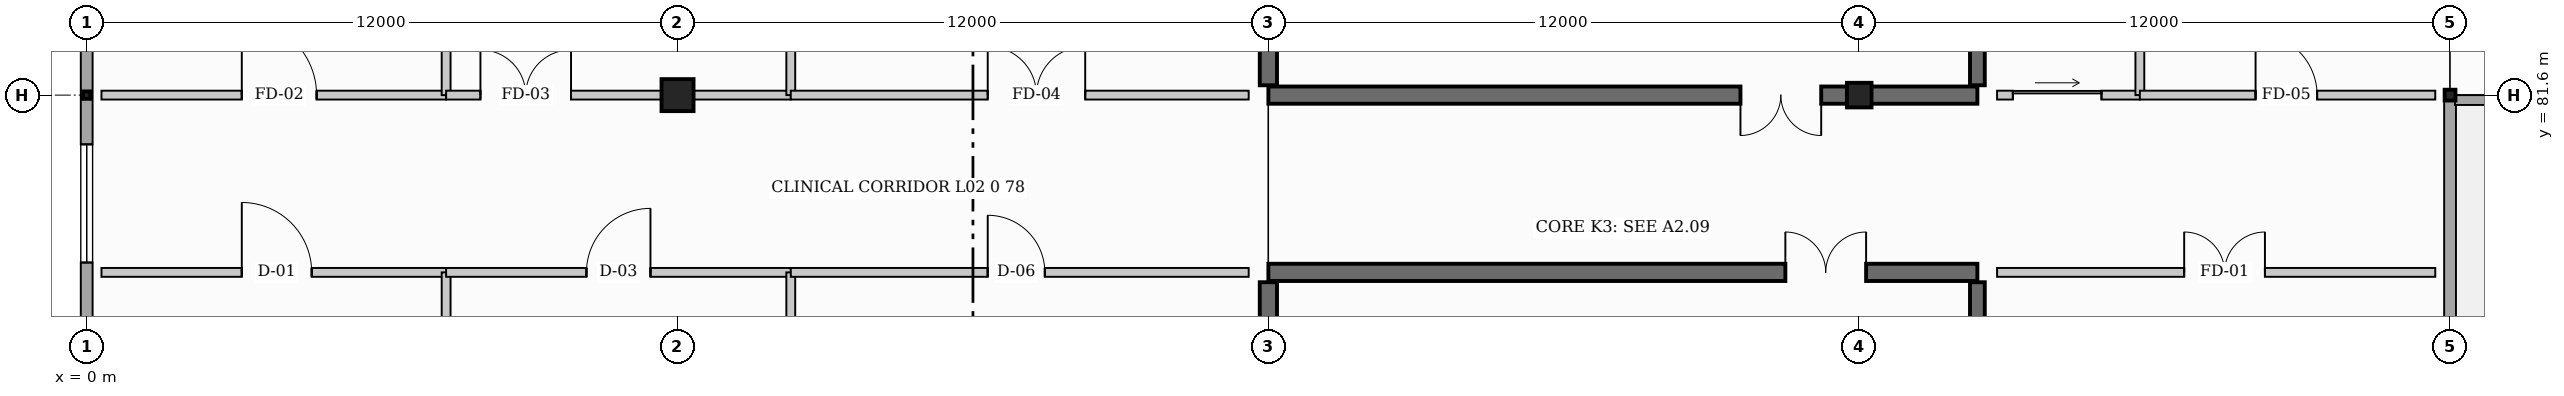
"""IFC4 building model, lengths in metres.
Left out: names, types, materials, properties, quantities, classifications, styles, units other than length and angle.
Written with IfcOpenShell. Run it as: python <this file> out.ifc"""

import sys

from ifc_helpers import new_model, si_unit, direction, frame, frame_2d, origin, origin_2d, place, context, subcontext, project, spatial, rectangle, hollow_rectangle, hollow_circle, i_section, extrude, element, fill, save


model = new_model("IFC4")
c1 = context("Model", 3, precision=1e-05, world=origin(), true_north=direction((0.0, 1.0)))
c2 = subcontext(c1, "Body", "Model", "MODEL_VIEW")
j1 = project(units=[si_unit("LENGTHUNIT", "METRE"), si_unit("PLANEANGLEUNIT", "RADIAN")], contexts=[c1])
p1 = place(None, origin())
s1 = spatial("IfcSite", under=j1, at=p1, CompositionType="ELEMENT")
p2 = place(p1, origin())
s2 = spatial("IfcBuilding", under=s1, at=p2, CompositionType="ELEMENT")
p3 = place(p2, frame((0.0, 0.0, 9.6)))
s3 = spatial("IfcBuildingStorey", under=s2, at=p3, CompositionType="ELEMENT", Elevation=9.6)
p4 = place(p3, frame((0.0, 81.6, 0.0), z_axis=(0.0, 0.0, 1.0), x_axis=(1.0, 0.0, 0.0)))
e1 = element("IfcColumn", 1, at=p4, inside=s3, PredefinedType="COLUMN", context=c2, shape_type="SweptSolid", body=[
    extrude(hollow_rectangle(XDim=0.15, YDim=0.15, WallThickness=0.008, at=origin_2d()), origin(), (0.0, 0.0, 1.0), 4.8),
])
p5 = place(p3, frame((12.0, 81.6, 0.0), z_axis=(0.0, 0.0, 1.0), x_axis=(0.0, 1.0, 0.0)))
e2 = element("IfcColumn", 2, at=p5, inside=s3, PredefinedType="COLUMN", context=c2, shape_type="SweptSolid", body=[
    extrude(rectangle(XDim=0.65, YDim=0.65, at=origin_2d()), origin(), (0.0, 0.0, 1.0), 4.8),
])
p6 = place(p3, frame((36.0, 81.6, 0.0), z_axis=(0.0, 0.0, 1.0), x_axis=(0.0, 1.0, 0.0)))
e3 = element("IfcColumn", 3, at=p6, inside=s3, PredefinedType="COLUMN", context=c2, shape_type="SweptSolid", body=[
    extrude(i_section(OverallWidth=0.5, OverallDepth=0.5, WebThickness=0.022, FlangeThickness=0.036, at=origin_2d()), origin(), (0.0, 0.0, 1.0), 4.8),
])
p7 = place(p3, frame((48.0, 81.6, 0.0), z_axis=(0.0, 0.0, 1.0), x_axis=(1.0, 0.0, 0.0)))
e4 = element("IfcColumn", 4, at=p7, inside=s3, PredefinedType="COLUMN", context=c2, shape_type="SweptSolid", body=[
    extrude(hollow_circle(Radius=0.11, WallThickness=0.01, at=origin_2d()), origin(), (0.0, 0.0, 1.0), 4.8),
])
p8 = place(p3, frame((24.0, 78.0, 0.0), z_axis=(0.0, 0.0, 1.0), x_axis=(1.0, 0.0, 0.0)))
e5 = element("IfcWall", 5, at=p8, inside=s3, PredefinedType="SHEAR", context=c2, shape_type="SweptSolid", body=[
    extrude(rectangle(XDim=14.4, YDim=0.35, at=frame_2d((7.2, 0.0))), origin(), (0.0, 0.0, 1.0), 4.8),
])
p9 = place(p8, frame((10.5, 0.0, 0.0)))
e6 = element("IfcOpeningElement", 6, at=p9, cuts=e5, PredefinedType="OPENING", context=c2, shape_type="SweptSolid", body=[
    extrude(rectangle(XDim=1.64, YDim=2.2, at=frame_2d((0.82, 1.1))), frame((0.0, 0.185, 0.0), z_axis=(0.0, -1.0, 0.0), x_axis=(1.0, 0.0, 0.0)), (0.0, 0.0, 1.0), 0.37),
])
p10 = place(p3, frame((24.0, 69.8, 0.0), z_axis=(0.0, 0.0, 1.0), x_axis=(0.0, 1.0, 0.0)))
e7 = element("IfcWall", 7, at=p10, inside=s3, PredefinedType="SHEAR", context=c2, shape_type="SweptSolid", body=[
    extrude(rectangle(XDim=8.0, YDim=0.35, at=frame_2d((4.0, 0.0))), origin(), (0.0, 0.0, 1.0), 4.8),
])
p11 = place(p3, frame((38.4, 77.8, 0.0), z_axis=(0.0, 0.0, 1.0), x_axis=(0.0, -1.0, 0.0)))
e8 = element("IfcWall", 8, at=p11, inside=s3, PredefinedType="SHEAR", context=c2, shape_type="SweptSolid", body=[
    extrude(rectangle(XDim=8.0, YDim=0.3, at=frame_2d((4.0, 0.0))), origin(), (0.0, 0.0, 1.0), 4.8),
])
p12 = place(p3, frame((38.4, 81.6, 0.0), z_axis=(0.0, 0.0, 1.0), x_axis=(-1.0, 0.0, 0.0)))
e9 = element("IfcWall", 9, at=p12, inside=s3, PredefinedType="SHEAR", context=c2, shape_type="SweptSolid", body=[
    extrude(rectangle(XDim=14.4, YDim=0.35, at=frame_2d((7.2, 0.0))), origin(), (0.0, 0.0, 1.0), 4.8),
])
p13 = place(p12, frame((3.172, 0.0, 0.0)))
e10 = element("IfcOpeningElement", 10, at=p13, cuts=e9, PredefinedType="OPENING", context=c2, shape_type="SweptSolid", body=[
    extrude(rectangle(XDim=1.64, YDim=2.2, at=frame_2d((0.82, 1.1))), frame((0.0, 0.185, 0.0), z_axis=(0.0, -1.0, 0.0), x_axis=(1.0, 0.0, 0.0)), (0.0, 0.0, 1.0), 0.37),
])
p14 = place(p3, frame((24.0, 81.8, 0.0), z_axis=(0.0, 0.0, 1.0), x_axis=(0.0, 1.0, 0.0)))
e11 = element("IfcWall", 11, at=p14, inside=s3, PredefinedType="SHEAR", context=c2, shape_type="SweptSolid", body=[
    extrude(rectangle(XDim=8.0, YDim=0.35, at=frame_2d((4.0, 0.0))), origin(), (0.0, 0.0, 1.0), 4.8),
])
p15 = place(p3, frame((38.4, 89.8, 0.0), z_axis=(0.0, 0.0, 1.0), x_axis=(0.0, -1.0, 0.0)))
e12 = element("IfcWall", 12, at=p15, inside=s3, PredefinedType="SHEAR", context=c2, shape_type="SweptSolid", body=[
    extrude(rectangle(XDim=8.0, YDim=0.3, at=frame_2d((4.0, 0.0))), origin(), (0.0, 0.0, 1.0), 4.8),
])
p16 = place(p3, frame((0.0, 57.6, 0.0), z_axis=(0.0, 0.0, 1.0), x_axis=(0.0, 1.0, 0.0)))
e13 = element("IfcWall", 13, at=p16, inside=s3, PredefinedType="STANDARD", context=c2, shape_type="SweptSolid", body=[
    extrude(rectangle(XDim=57.6, YDim=0.24, at=frame_2d((28.8, 0.0))), origin(), (0.0, 0.0, 1.0), 3.465),
])
p17 = place(p16, frame((1.1, 0.0, 2.1)))
e14 = element("IfcOpeningElement", 14, at=p17, cuts=e13, PredefinedType="OPENING", context=c2, shape_type="SweptSolid", body=[
    extrude(rectangle(XDim=2.4, YDim=0.9, at=frame_2d((1.2, 0.45))), frame((0.0, 0.13, 0.0), z_axis=(0.0, -1.0, 0.0), x_axis=(1.0, 0.0, 0.0)), (0.0, 0.0, 1.0), 0.26),
])
p18 = place(p16, frame((5.0, 0.0, 2.1)))
e15 = element("IfcOpeningElement", 15, at=p18, cuts=e13, PredefinedType="OPENING", context=c2, shape_type="SweptSolid", body=[
    extrude(rectangle(XDim=2.4, YDim=0.9, at=frame_2d((1.2, 0.45))), frame((0.0, 0.13, 0.0), z_axis=(0.0, -1.0, 0.0), x_axis=(1.0, 0.0, 0.0)), (0.0, 0.0, 1.0), 0.26),
])
p19 = place(p16, frame((16.7, 0.0, 2.1)))
e16 = element("IfcOpeningElement", 16, at=p19, cuts=e13, PredefinedType="OPENING", context=c2, shape_type="SweptSolid", body=[
    extrude(rectangle(XDim=2.4, YDim=0.9, at=frame_2d((1.2, 0.45))), frame((0.0, 0.13, 0.0), z_axis=(0.0, -1.0, 0.0), x_axis=(1.0, 0.0, 0.0)), (0.0, 0.0, 1.0), 0.26),
])
p20 = place(p16, frame((20.6, 0.0, 2.1)))
e17 = element("IfcOpeningElement", 17, at=p20, cuts=e13, PredefinedType="OPENING", context=c2, shape_type="SweptSolid", body=[
    extrude(rectangle(XDim=2.4, YDim=0.9, at=frame_2d((1.2, 0.45))), frame((0.0, 0.13, 0.0), z_axis=(0.0, -1.0, 0.0), x_axis=(1.0, 0.0, 0.0)), (0.0, 0.0, 1.0), 0.26),
])
p21 = place(p16, frame((28.4, 0.0, 2.1)))
e18 = element("IfcOpeningElement", 18, at=p21, cuts=e13, PredefinedType="OPENING", context=c2, shape_type="SweptSolid", body=[
    extrude(rectangle(XDim=2.4, YDim=0.9, at=frame_2d((1.2, 0.45))), frame((0.0, 0.13, 0.0), z_axis=(0.0, -1.0, 0.0), x_axis=(1.0, 0.0, 0.0)), (0.0, 0.0, 1.0), 0.26),
])
p22 = place(p16, frame((32.3, 0.0, 2.1)))
e19 = element("IfcOpeningElement", 19, at=p22, cuts=e13, PredefinedType="OPENING", context=c2, shape_type="SweptSolid", body=[
    extrude(rectangle(XDim=2.4, YDim=0.9, at=frame_2d((1.2, 0.45))), frame((0.0, 0.13, 0.0), z_axis=(0.0, -1.0, 0.0), x_axis=(1.0, 0.0, 0.0)), (0.0, 0.0, 1.0), 0.26),
])
p23 = place(p16, frame((40.1, 0.0, 2.1)))
e20 = element("IfcOpeningElement", 20, at=p23, cuts=e13, PredefinedType="OPENING", context=c2, shape_type="SweptSolid", body=[
    extrude(rectangle(XDim=2.4, YDim=0.9, at=frame_2d((1.2, 0.45))), frame((0.0, 0.13, 0.0), z_axis=(0.0, -1.0, 0.0), x_axis=(1.0, 0.0, 0.0)), (0.0, 0.0, 1.0), 0.26),
])
p24 = place(p16, frame((47.9, 0.0, 2.1)))
e21 = element("IfcOpeningElement", 21, at=p24, cuts=e13, PredefinedType="OPENING", context=c2, shape_type="SweptSolid", body=[
    extrude(rectangle(XDim=2.4, YDim=0.9, at=frame_2d((1.2, 0.45))), frame((0.0, 0.13, 0.0), z_axis=(0.0, -1.0, 0.0), x_axis=(1.0, 0.0, 0.0)), (0.0, 0.0, 1.0), 0.26),
])
p25 = place(p16, frame((51.8, 0.0, 2.1)))
e22 = element("IfcOpeningElement", 22, at=p25, cuts=e13, PredefinedType="OPENING", context=c2, shape_type="SweptSolid", body=[
    extrude(rectangle(XDim=2.4, YDim=0.9, at=frame_2d((1.2, 0.45))), frame((0.0, 0.13, 0.0), z_axis=(0.0, -1.0, 0.0), x_axis=(1.0, 0.0, 0.0)), (0.0, 0.0, 1.0), 0.26),
])
p26 = place(p3, frame((48.0, 81.6, 0.0), z_axis=(0.0, 0.0, 1.0), x_axis=(0.0, -1.0, 0.0)))
e23 = element("IfcWall", 23, at=p26, inside=s3, PredefinedType="STANDARD", context=c2, shape_type="SweptSolid", body=[
    extrude(rectangle(XDim=24.0, YDim=0.24, at=frame_2d((12.0, 0.0))), origin(), (0.0, 0.0, 1.0), 3.665),
])
p27 = place(p3, frame((48.1, 81.5, 0.33), z_axis=(0.0, 0.0, 1.0), x_axis=(1.0, 0.0, 0.0)))
e24 = element("IfcWall", 24, at=p27, inside=s3, PredefinedType="PARAPET", context=c2, shape_type="SweptSolid", body=[
    extrude(rectangle(XDim=11.8, YDim=0.2, at=frame_2d((5.9, 0.0))), origin(), (0.0, 0.0, 1.0), 1.12),
])
p28 = place(p3, frame((0.3, 78.0, 0.0), z_axis=(0.0, 0.0, 1.0), x_axis=(1.0, 0.0, 0.0)))
e25 = element("IfcWall", 25, at=p28, inside=s3, PredefinedType="PARTITIONING", context=c2, shape_type="SweptSolid", body=[
    extrude(rectangle(XDim=7.0, YDim=0.18, at=frame_2d((3.5, 0.0))), origin(), (0.0, 0.0, 1.0), 4.065),
])
p29 = place(p28, frame((2.85, 0.0, 0.0)))
e26 = element("IfcOpeningElement", 26, at=p29, cuts=e25, PredefinedType="OPENING", context=c2, shape_type="SweptSolid", body=[
    extrude(rectangle(XDim=1.42, YDim=2.22, at=frame_2d((0.71, 1.11))), frame((0.0, 0.1, 0.0), z_axis=(0.0, -1.0, 0.0), x_axis=(1.0, 0.0, 0.0)), (0.0, 0.0, 1.0), 0.2),
])
p30 = place(p3, frame((7.3, 57.9, 0.0), z_axis=(0.0, 0.0, 1.0), x_axis=(0.0, 1.0, 0.0)))
e27 = element("IfcWall", 27, at=p30, inside=s3, PredefinedType="PARTITIONING", context=c2, shape_type="SweptSolid", body=[
    extrude(rectangle(XDim=20.1, YDim=0.18, at=frame_2d((10.05, 0.0))), origin(), (0.0, 0.0, 1.0), 3.882),
])
p31 = place(p3, frame((7.3, 78.0, 0.0), z_axis=(0.0, 0.0, 1.0), x_axis=(1.0, 0.0, 0.0)))
e28 = element("IfcWall", 28, at=p31, inside=s3, PredefinedType="PARTITIONING", context=c2, shape_type="SweptSolid", body=[
    extrude(rectangle(XDim=7.0, YDim=0.18, at=frame_2d((3.5, 0.0))), origin(), (0.0, 0.0, 1.0), 3.465),
])
p32 = place(p31, frame((2.85, 0.0, 0.0)))
e29 = element("IfcOpeningElement", 29, at=p32, cuts=e28, PredefinedType="OPENING", context=c2, shape_type="SweptSolid", body=[
    extrude(rectangle(XDim=1.3, YDim=2.16, at=frame_2d((0.65, 1.08))), frame((0.0, 0.1, 0.0), z_axis=(0.0, -1.0, 0.0), x_axis=(1.0, 0.0, 0.0)), (0.0, 0.0, 1.0), 0.2),
])
p33 = place(p3, frame((14.3, 57.9, 0.0), z_axis=(0.0, 0.0, 1.0), x_axis=(0.0, 1.0, 0.0)))
e30 = element("IfcWall", 30, at=p33, inside=s3, PredefinedType="PARTITIONING", context=c2, shape_type="SweptSolid", body=[
    extrude(rectangle(XDim=20.1, YDim=0.18, at=frame_2d((10.05, 0.0))), origin(), (0.0, 0.0, 1.0), 3.887),
])
p34 = place(p3, frame((14.3, 78.0, 0.0), z_axis=(0.0, 0.0, 1.0), x_axis=(1.0, 0.0, 0.0)))
e31 = element("IfcWall", 31, at=p34, inside=s3, PredefinedType="PARTITIONING", context=c2, shape_type="SweptSolid", body=[
    extrude(rectangle(XDim=9.3, YDim=0.18, at=frame_2d((4.65, 0.0))), origin(), (0.0, 0.0, 1.0), 4.43),
])
p35 = place(p34, frame((4.0, 0.0, 0.0)))
e32 = element("IfcOpeningElement", 32, at=p35, cuts=e31, PredefinedType="OPENING", context=c2, shape_type="SweptSolid", body=[
    extrude(rectangle(XDim=1.16, YDim=2.1, at=frame_2d((0.58, 1.05))), frame((0.0, 0.1, 0.0), z_axis=(0.0, -1.0, 0.0), x_axis=(1.0, 0.0, 0.0)), (0.0, 0.0, 1.0), 0.2),
])
p36 = place(p3, frame((38.8, 78.0, 0.0), z_axis=(0.0, 0.0, 1.0), x_axis=(1.0, 0.0, 0.0)))
e33 = element("IfcWall", 33, at=p36, inside=s3, PredefinedType="PARTITIONING", context=c2, shape_type="SweptSolid", body=[
    extrude(rectangle(XDim=8.9, YDim=0.18, at=frame_2d((4.45, 0.0))), origin(), (0.0, 0.0, 1.0), 4.135),
])
p37 = place(p36, frame((3.8, 0.0, 0.0)))
e34 = element("IfcOpeningElement", 34, at=p37, cuts=e33, PredefinedType="OPENING", context=c2, shape_type="SweptSolid", body=[
    extrude(rectangle(XDim=1.64, YDim=2.2, at=frame_2d((0.82, 1.1))), frame((0.0, 0.1, 0.0), z_axis=(0.0, -1.0, 0.0), x_axis=(1.0, 0.0, 0.0)), (0.0, 0.0, 1.0), 0.2),
])
p38 = place(p3, frame((0.3, 81.6, 0.0), z_axis=(0.0, 0.0, 1.0), x_axis=(1.0, 0.0, 0.0)))
e35 = element("IfcWall", 35, at=p38, inside=s3, PredefinedType="PARTITIONING", context=c2, shape_type="SweptSolid", body=[
    extrude(rectangle(XDim=7.0, YDim=0.18, at=frame_2d((3.5, 0.0))), origin(), (0.0, 0.0, 1.0), 3.955),
])
p39 = place(p38, frame((2.85, 0.0, 0.0)))
e36 = element("IfcOpeningElement", 36, at=p39, cuts=e35, PredefinedType="OPENING", context=c2, shape_type="SweptSolid", body=[
    extrude(rectangle(XDim=1.52, YDim=2.16, at=frame_2d((0.76, 1.08))), frame((0.0, 0.1, 0.0), z_axis=(0.0, -1.0, 0.0), x_axis=(1.0, 0.0, 0.0)), (0.0, 0.0, 1.0), 0.2),
])
p40 = place(p3, frame((7.3, 81.6, 0.0), z_axis=(0.0, 0.0, 1.0), x_axis=(0.0, 1.0, 0.0)))
e37 = element("IfcWall", 37, at=p40, inside=s3, PredefinedType="PARTITIONING", context=c2, shape_type="SweptSolid", body=[
    extrude(rectangle(XDim=33.3, YDim=0.18, at=frame_2d((16.65, 0.0))), origin(), (0.0, 0.0, 1.0), 3.465),
])
p41 = place(p3, frame((7.3, 81.6, 0.0), z_axis=(0.0, 0.0, 1.0), x_axis=(1.0, 0.0, 0.0)))
e38 = element("IfcWall", 38, at=p41, inside=s3, PredefinedType="PARTITIONING", context=c2, shape_type="SweptSolid", body=[
    extrude(rectangle(XDim=7.0, YDim=0.18, at=frame_2d((3.5, 0.0))), origin(), (0.0, 0.0, 1.0), 3.465),
])
p42 = place(p41, frame((0.697, 0.0, 0.0)))
e39 = element("IfcOpeningElement", 39, at=p42, cuts=e38, PredefinedType="OPENING", context=c2, shape_type="SweptSolid", body=[
    extrude(rectangle(XDim=1.84, YDim=2.22, at=frame_2d((0.92, 1.11))), frame((0.0, 0.1, 0.0), z_axis=(0.0, -1.0, 0.0), x_axis=(1.0, 0.0, 0.0)), (0.0, 0.0, 1.0), 0.2),
])
p43 = place(p3, frame((14.3, 81.6, 0.0), z_axis=(0.0, 0.0, 1.0), x_axis=(0.0, 1.0, 0.0)))
e40 = element("IfcWall", 40, at=p43, inside=s3, PredefinedType="PARTITIONING", context=c2, shape_type="SweptSolid", body=[
    extrude(rectangle(XDim=33.3, YDim=0.18, at=frame_2d((16.65, 0.0))), origin(), (0.0, 0.0, 1.0), 3.465),
])
p44 = place(p3, frame((14.3, 81.6, 0.0), z_axis=(0.0, 0.0, 1.0), x_axis=(1.0, 0.0, 0.0)))
e41 = element("IfcWall", 41, at=p44, inside=s3, PredefinedType="PARTITIONING", context=c2, shape_type="SweptSolid", body=[
    extrude(rectangle(XDim=9.3, YDim=0.18, at=frame_2d((4.65, 0.0))), origin(), (0.0, 0.0, 1.0), 4.43),
])
p45 = place(p44, frame((4.0, 0.0, 0.0)))
e42 = element("IfcOpeningElement", 42, at=p45, cuts=e41, PredefinedType="OPENING", context=c2, shape_type="SweptSolid", body=[
    extrude(rectangle(XDim=1.98, YDim=2.26, at=frame_2d((0.99, 1.13))), frame((0.0, 0.1, 0.0), z_axis=(0.0, -1.0, 0.0), x_axis=(1.0, 0.0, 0.0)), (0.0, 0.0, 1.0), 0.2),
])
p46 = place(p3, frame((38.8, 81.6, 0.0), z_axis=(0.0, 0.0, 1.0), x_axis=(1.0, 0.0, 0.0)))
e43 = element("IfcWall", 43, at=p46, inside=s3, PredefinedType="PARTITIONING", context=c2, shape_type="SweptSolid", body=[
    extrude(rectangle(XDim=2.9, YDim=0.18, at=frame_2d((1.45, 0.0))), origin(), (0.0, 0.0, 1.0), 3.835),
])
p47 = place(p46, frame((0.32, 0.0, 0.0)))
e44 = element("IfcOpeningElement", 44, at=p47, cuts=e43, PredefinedType="OPENING", context=c2, shape_type="SweptSolid", body=[
    extrude(rectangle(XDim=1.8, YDim=2.32, at=frame_2d((0.9, 1.16))), frame((0.0, 0.1, 0.0), z_axis=(0.0, -1.0, 0.0), x_axis=(1.0, 0.0, 0.0)), (0.0, 0.0, 1.0), 0.2),
])
p48 = place(p3, frame((41.7, 81.6, 0.0), z_axis=(0.0, 0.0, 1.0), x_axis=(0.0, 1.0, 0.0)))
e45 = element("IfcWall", 45, at=p48, inside=s3, PredefinedType="PARTITIONING", context=c2, shape_type="SweptSolid", body=[
    extrude(rectangle(XDim=33.3, YDim=0.18, at=frame_2d((16.65, 0.0))), origin(), (0.0, 0.0, 1.0), 3.835),
])
p49 = place(p3, frame((41.7, 81.6, 0.0), z_axis=(0.0, 0.0, 1.0), x_axis=(1.0, 0.0, 0.0)))
e46 = element("IfcWall", 46, at=p49, inside=s3, PredefinedType="PARTITIONING", context=c2, shape_type="SweptSolid", body=[
    extrude(rectangle(XDim=6.0, YDim=0.18, at=frame_2d((3.0, 0.0))), origin(), (0.0, 0.0, 1.0), 3.835),
])
p50 = place(p49, frame((2.35, 0.0, 0.0)))
e47 = element("IfcOpeningElement", 47, at=p50, cuts=e46, PredefinedType="OPENING", context=c2, shape_type="SweptSolid", body=[
    extrude(rectangle(XDim=1.25, YDim=2.15, at=frame_2d((0.625, 1.075))), frame((0.0, 0.1, 0.0), z_axis=(0.0, -1.0, 0.0), x_axis=(1.0, 0.0, 0.0)), (0.0, 0.0, 1.0), 0.2),
])
p51 = place(p20, origin())
e48 = element("IfcWindow", 48, at=p51, inside=s3, PartitioningType="DOUBLE_PANEL_HORIZONTAL", PredefinedType="WINDOW", context=c2, shape_type="SweptSolid", body=[
    extrude(rectangle(XDim=2.4, YDim=0.9, at=frame_2d((1.2, 0.45))), frame((0.0, 0.03, 0.0), z_axis=(0.0, -1.0, 0.0), x_axis=(1.0, 0.0, 0.0)), (0.0, 0.0, 1.0), 0.06),
])
fill(e17, e48)
p52 = place(p9, origin())
e49 = element("IfcDoor", 49, at=p52, inside=s3, OperationType="DOUBLE_DOOR_SINGLE_SWING", PredefinedType="DOOR", context=c2, shape_type="SweptSolid", body=[
    extrude(rectangle(XDim=1.64, YDim=2.2, at=frame_2d((0.82, 1.1))), frame((0.0, 0.025, 0.0), z_axis=(0.0, -1.0, 0.0), x_axis=(1.0, 0.0, 0.0)), (0.0, 0.0, 1.0), 0.05),
])
fill(e6, e49)
p53 = place(p13, origin())
e50 = element("IfcDoor", 50, at=p53, inside=s3, OperationType="DOUBLE_DOOR_SINGLE_SWING", PredefinedType="DOOR", context=c2, shape_type="SweptSolid", body=[
    extrude(rectangle(XDim=1.64, YDim=2.2, at=frame_2d((0.82, 1.1))), frame((0.0, 0.025, 0.0), z_axis=(0.0, -1.0, 0.0), x_axis=(1.0, 0.0, 0.0)), (0.0, 0.0, 1.0), 0.05),
])
fill(e10, e50)
p54 = place(p29, origin())
e51 = element("IfcDoor", 51, at=p54, inside=s3, OperationType="SINGLE_SWING_LEFT", PredefinedType="DOOR", context=c2, shape_type="SweptSolid", body=[
    extrude(rectangle(XDim=1.42, YDim=2.22, at=frame_2d((0.71, 1.11))), frame((0.0, 0.025, 0.0), z_axis=(0.0, -1.0, 0.0), x_axis=(1.0, 0.0, 0.0)), (0.0, 0.0, 1.0), 0.05),
])
fill(e26, e51)
p55 = place(p32, origin())
e52 = element("IfcDoor", 52, at=p55, inside=s3, OperationType="SINGLE_SWING_RIGHT", PredefinedType="DOOR", context=c2, shape_type="SweptSolid", body=[
    extrude(rectangle(XDim=1.3, YDim=2.16, at=frame_2d((0.65, 1.08))), frame((0.0, 0.025, 0.0), z_axis=(0.0, -1.0, 0.0), x_axis=(1.0, 0.0, 0.0)), (0.0, 0.0, 1.0), 0.05),
])
fill(e29, e52)
p56 = place(p35, origin())
e53 = element("IfcDoor", 53, at=p56, inside=s3, OperationType="SINGLE_SWING_LEFT", PredefinedType="DOOR", context=c2, shape_type="SweptSolid", body=[
    extrude(rectangle(XDim=1.16, YDim=2.1, at=frame_2d((0.58, 1.05))), frame((0.0, 0.025, 0.0), z_axis=(0.0, -1.0, 0.0), x_axis=(1.0, 0.0, 0.0)), (0.0, 0.0, 1.0), 0.05),
])
fill(e32, e53)
p57 = place(p37, origin())
e54 = element("IfcDoor", 54, at=p57, inside=s3, OperationType="DOUBLE_DOOR_SINGLE_SWING", PredefinedType="DOOR", context=c2, shape_type="SweptSolid", body=[
    extrude(rectangle(XDim=1.64, YDim=2.2, at=frame_2d((0.82, 1.1))), frame((0.0, 0.025, 0.0), z_axis=(0.0, -1.0, 0.0), x_axis=(1.0, 0.0, 0.0)), (0.0, 0.0, 1.0), 0.05),
])
fill(e34, e54)
p58 = place(p39, origin())
e55 = element("IfcDoor", 55, at=p58, inside=s3, OperationType="SINGLE_SWING_LEFT", PredefinedType="DOOR", context=c2, shape_type="SweptSolid", body=[
    extrude(rectangle(XDim=1.52, YDim=2.16, at=frame_2d((0.76, 1.08))), frame((0.0, 0.025, 0.0), z_axis=(0.0, -1.0, 0.0), x_axis=(1.0, 0.0, 0.0)), (0.0, 0.0, 1.0), 0.05),
])
fill(e36, e55)
p59 = place(p42, origin())
e56 = element("IfcDoor", 56, at=p59, inside=s3, OperationType="DOUBLE_DOOR_SINGLE_SWING", PredefinedType="DOOR", context=c2, shape_type="SweptSolid", body=[
    extrude(rectangle(XDim=1.84, YDim=2.22, at=frame_2d((0.92, 1.11))), frame((0.0, 0.025, 0.0), z_axis=(0.0, -1.0, 0.0), x_axis=(1.0, 0.0, 0.0)), (0.0, 0.0, 1.0), 0.05),
])
fill(e39, e56)
p60 = place(p45, origin())
e57 = element("IfcDoor", 57, at=p60, inside=s3, OperationType="DOUBLE_DOOR_SINGLE_SWING", PredefinedType="DOOR", context=c2, shape_type="SweptSolid", body=[
    extrude(rectangle(XDim=1.98, YDim=2.26, at=frame_2d((0.99, 1.13))), frame((0.0, 0.025, 0.0), z_axis=(0.0, -1.0, 0.0), x_axis=(1.0, 0.0, 0.0)), (0.0, 0.0, 1.0), 0.05),
])
fill(e42, e57)
p61 = place(p47, origin())
e58 = element("IfcDoor", 58, at=p61, inside=s3, OperationType="SLIDING_TO_LEFT", PredefinedType="DOOR", context=c2, shape_type="SweptSolid", body=[
    extrude(rectangle(XDim=1.8, YDim=2.32, at=frame_2d((0.9, 1.16))), frame((0.0, 0.025, 0.0), z_axis=(0.0, -1.0, 0.0), x_axis=(1.0, 0.0, 0.0)), (0.0, 0.0, 1.0), 0.05),
])
fill(e44, e58)
p62 = place(p50, origin())
e59 = element("IfcDoor", 59, at=p62, inside=s3, OperationType="SINGLE_SWING_LEFT", PredefinedType="DOOR", context=c2, shape_type="SweptSolid", body=[
    extrude(rectangle(XDim=1.25, YDim=2.15, at=frame_2d((0.625, 1.075))), frame((0.0, 0.025, 0.0), z_axis=(0.0, -1.0, 0.0), x_axis=(1.0, 0.0, 0.0)), (0.0, 0.0, 1.0), 0.05),
])
fill(e47, e59)
save(model, sys.argv[1])
